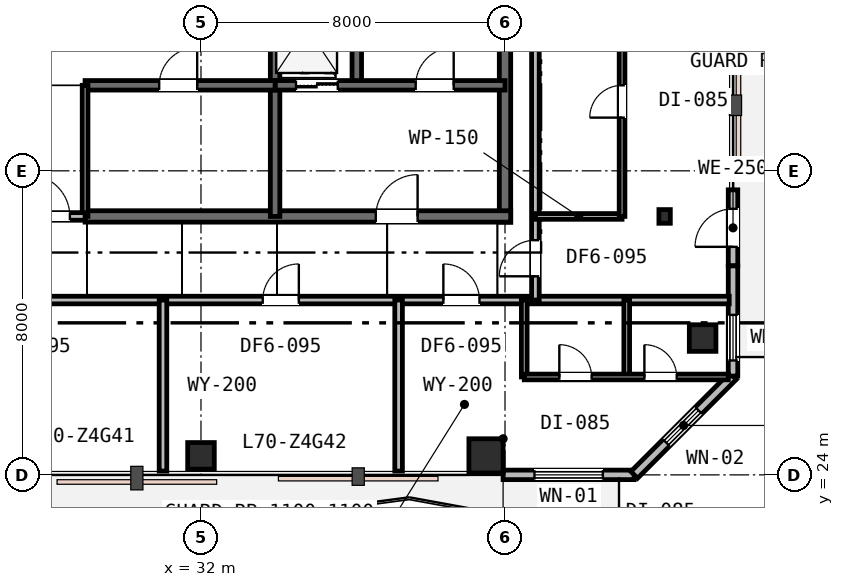
"""IFC4 building model, lengths in metres.
Left out: names, types, materials, properties, quantities, classifications, styles, units other than length and angle.
Written with IfcOpenShell. Run it as: python <this file> out.ifc"""

import sys

from ifc_helpers import new_model, si_unit, direction, frame, frame_2d, origin, origin_2d, place, context, subcontext, project, spatial, rectangle, i_section, extrude, element, fill, save


model = new_model("IFC4")
c1 = context("Model", 3, precision=1e-05, world=origin(), true_north=direction((0.0, 1.0)))
c2 = subcontext(c1, "Body", "Model", "MODEL_VIEW")
j1 = project(units=[si_unit("LENGTHUNIT", "METRE"), si_unit("PLANEANGLEUNIT", "RADIAN")], contexts=[c1])
p1 = place(None, origin())
s1 = spatial("IfcSite", under=j1, at=p1, CompositionType="ELEMENT")
p2 = place(p1, origin())
s2 = spatial("IfcBuilding", under=s1, at=p2, CompositionType="ELEMENT")
p3 = place(p2, frame((0.0, 0.0, 271.6)))
s3 = spatial("IfcBuildingStorey", under=s2, at=p3, CompositionType="ELEMENT", Elevation=271.6)
p4 = place(p3, frame((40.0, 30.65, 0.0), z_axis=(0.0, 0.0, 1.0), x_axis=(0.0, 1.0, 0.0)))
e1 = element("IfcWall", 1, at=p4, inside=s3, PredefinedType="SHEAR", context=c2, shape_type="SweptSolid", body=[
    extrude(rectangle(XDim=12.3, YDim=0.3, at=frame_2d((6.15, 0.0))), origin(), (0.0, 0.0, 1.0), 3.8),
])
p5 = place(p3, frame((28.95, 30.8, 0.0), z_axis=(0.0, 0.0, 1.0), x_axis=(1.0, 0.0, 0.0)))
e2 = element("IfcWall", 2, at=p5, inside=s3, PredefinedType="SHEAR", context=c2, shape_type="SweptSolid", body=[
    extrude(rectangle(XDim=11.2, YDim=0.3, at=frame_2d((5.6, 0.0))), origin(), (0.0, 0.0, 1.0), 3.8),
])
p6 = place(p5, frame((7.65, 0.0, 0.0)))
e3 = element("IfcOpeningElement", 3, at=p6, cuts=e2, PredefinedType="OPENING", context=c2, shape_type="SweptSolid", body=[
    extrude(rectangle(XDim=1.1, YDim=2.15, at=frame_2d((0.55, 1.075))), frame((0.0, 0.16, 0.0), z_axis=(0.0, -1.0, 0.0), x_axis=(1.0, 0.0, 0.0)), (0.0, 0.0, 1.0), 0.32),
])
p7 = place(p3, frame((36.1, 34.25, 0.0), z_axis=(0.0, 0.0, 1.0), x_axis=(0.0, 1.0, 0.0)))
e4 = element("IfcWall", 4, at=p7, inside=s3, PredefinedType="SHEAR", context=c2, shape_type="SweptSolid", body=[
    extrude(rectangle(XDim=8.65, YDim=0.25, at=frame_2d((4.325, 0.0))), origin(), (0.0, 0.0, 1.0), 3.8),
])
p8 = place(p3, frame((33.95, 30.8, 0.0), z_axis=(0.0, 0.0, 1.0), x_axis=(0.0, 1.0, 0.0)))
e5 = element("IfcWall", 5, at=p8, inside=s3, PredefinedType="SHEAR", context=c2, shape_type="SweptSolid", body=[
    extrude(rectangle(XDim=6.45, YDim=0.25, at=frame_2d((3.225, 0.0))), origin(), (0.0, 0.0, 1.0), 3.8),
])
p9 = place(p3, frame((33.95, 34.25, 0.0), z_axis=(0.0, 0.0, 1.0), x_axis=(1.0, 0.0, 0.0)))
e6 = element("IfcWall", 6, at=p9, inside=s3, PredefinedType="SHEAR", context=c2, shape_type="SweptSolid", body=[
    extrude(rectangle(XDim=6.05, YDim=0.25, at=frame_2d((3.025, 0.0))), origin(), (0.0, 0.0, 1.0), 3.8),
])
p10 = place(p9, frame((3.7, 0.0, 0.0)))
e7 = element("IfcOpeningElement", 7, at=p10, cuts=e6, PredefinedType="OPENING", context=c2, shape_type="SweptSolid", body=[
    extrude(rectangle(XDim=1.0, YDim=2.15, at=frame_2d((0.5, 1.075))), frame((0.0, 0.135, 0.0), z_axis=(0.0, -1.0, 0.0), x_axis=(1.0, 0.0, 0.0)), (0.0, 0.0, 1.0), 0.27),
])
p11 = place(p9, frame((0.55, 0.0, 0.0)))
e8 = element("IfcOpeningElement", 8, at=p11, cuts=e6, PredefinedType="OPENING", context=c2, shape_type="SweptSolid", body=[
    extrude(rectangle(XDim=1.1, YDim=2.15, at=frame_2d((0.55, 1.075))), frame((0.0, 0.135, 0.0), z_axis=(0.0, -1.0, 0.0), x_axis=(1.0, 0.0, 0.0)), (0.0, 0.0, 1.0), 0.27),
])
p12 = place(p3, frame((28.95, 34.25, 0.0), z_axis=(0.0, 0.0, 1.0), x_axis=(1.0, 0.0, 0.0)))
e9 = element("IfcWall", 9, at=p12, inside=s3, PredefinedType="SHEAR", context=c2, shape_type="SweptSolid", body=[
    extrude(rectangle(XDim=5.0, YDim=0.25, at=frame_2d((2.5, 0.0))), origin(), (0.0, 0.0, 1.0), 3.8),
])
p13 = place(p12, frame((1.95, 0.0, 0.0)))
e10 = element("IfcOpeningElement", 10, at=p13, cuts=e9, PredefinedType="OPENING", context=c2, shape_type="SweptSolid", body=[
    extrude(rectangle(XDim=1.0, YDim=2.15, at=frame_2d((0.5, 1.075))), frame((0.0, 0.135, 0.0), z_axis=(0.0, -1.0, 0.0), x_axis=(1.0, 0.0, 0.0)), (0.0, 0.0, 1.0), 0.27),
])
p14 = place(p3, frame((32.0, 24.5, 0.0), z_axis=(0.0, 0.0, 1.0), x_axis=(1.0, 0.0, 0.0)))
e11 = element("IfcColumn", 11, at=p14, inside=s3, PredefinedType="COLUMN", context=c2, shape_type="SweptSolid", body=[
    extrude(rectangle(XDim=0.7, YDim=0.7, at=origin_2d()), origin(), (0.0, 0.0, 1.0), 3.8),
])
p15 = place(p3, frame((39.5, 24.5, 0.0), z_axis=(0.0, 0.0, 1.0), x_axis=(1.0, 0.0, 0.0)))
e12 = element("IfcColumn", 12, at=p15, inside=s3, PredefinedType="COLUMN", context=c2, shape_type="SweptSolid", body=[
    extrude(rectangle(XDim=0.9, YDim=0.9, at=origin_2d()), origin(), (0.0, 0.0, 1.0), 3.8),
])
p16 = place(p3, frame((45.2, 27.6, 0.0), z_axis=(0.0, 0.0, 1.0), x_axis=(1.0, 0.0, 0.0)))
e13 = element("IfcColumn", 13, at=p16, inside=s3, PredefinedType="COLUMN", context=c2, shape_type="SweptSolid", body=[
    extrude(rectangle(XDim=0.7, YDim=0.7, at=origin_2d()), origin(), (0.0, 0.0, 1.0), 3.8),
])
p17 = place(p3, frame((44.2, 30.8, 0.0), z_axis=(0.0, 0.0, 1.0), x_axis=(1.0, 0.0, 0.0)))
e14 = element("IfcColumn", 14, at=p17, inside=s3, PredefinedType="COLUMN", context=c2, shape_type="SweptSolid", body=[
    extrude(i_section(OverallWidth=0.3, OverallDepth=0.36, WebThickness=0.013, FlangeThickness=0.022, FilletRadius=0.027, at=origin_2d()), origin(), (0.0, 0.0, 1.0), 3.8),
])
p18 = place(p3, frame((39.95, 24.0, 0.0), z_axis=(0.0, 0.0, 1.0), x_axis=(1.0, 0.0, 0.0)))
e15 = element("IfcWall", 15, at=p18, inside=s3, PredefinedType="STANDARD", context=c2, shape_type="SweptSolid", body=[
    extrude(rectangle(XDim=3.45, YDim=0.25, at=frame_2d((1.725, 0.0))), origin(), (0.0, 0.0, 1.0), 3.53),
])
p19 = place(p18, frame((0.825, 0.0, 0.75)))
e16 = element("IfcOpeningElement", 16, at=p19, cuts=e15, PredefinedType="OPENING", context=c2, shape_type="SweptSolid", body=[
    extrude(rectangle(XDim=1.8, YDim=1.85, at=frame_2d((0.9, 0.925))), frame((0.0, 0.135, 0.0), z_axis=(0.0, -1.0, 0.0), x_axis=(1.0, 0.0, 0.0)), (0.0, 0.0, 1.0), 0.27),
])
p20 = place(p3, frame((43.4, 24.0, 0.0), z_axis=(0.0, 0.0, 1.0), x_axis=(0.707106781187, 0.707106781187, 0.0)))
e17 = element("IfcWall", 17, at=p20, inside=s3, PredefinedType="STANDARD", context=c2, shape_type="SweptSolid", body=[
    extrude(rectangle(XDim=3.677, YDim=0.25, at=frame_2d((1.839, 0.0))), origin(), (0.0, 0.0, 1.0), 3.53),
])
p21 = place(p20, frame((1.196, 0.0, 0.85)))
e18 = element("IfcOpeningElement", 18, at=p21, cuts=e17, PredefinedType="OPENING", context=c2, shape_type="SweptSolid", body=[
    extrude(rectangle(XDim=1.2, YDim=1.6, at=frame_2d((0.6, 0.8))), frame((0.0, 0.135, 0.0), z_axis=(0.0, -1.0, 0.0), x_axis=(1.0, 0.0, 0.0)), (0.0, 0.0, 1.0), 0.27),
])
p22 = place(p3, frame((46.0, 29.5, 0.0), z_axis=(0.0, 0.0, 1.0), x_axis=(0.0, 1.0, 0.0)))
e19 = element("IfcWall", 19, at=p22, inside=s3, PredefinedType="STANDARD", context=c2, shape_type="SweptSolid", body=[
    extrude(rectangle(XDim=2.0, YDim=0.25, at=frame_2d((1.0, 0.0))), origin(), (0.0, 0.0, 1.0), 3.53),
])
p23 = place(p22, frame((0.5, 0.0, 0.0)))
e20 = element("IfcOpeningElement", 20, at=p23, cuts=e19, PredefinedType="OPENING", context=c2, shape_type="SweptSolid", body=[
    extrude(rectangle(XDim=1.0, YDim=2.15, at=frame_2d((0.5, 1.075))), frame((0.0, 0.135, 0.0), z_axis=(0.0, -1.0, 0.0), x_axis=(1.0, 0.0, 0.0)), (0.0, 0.0, 1.0), 0.27),
])
p24 = place(p3, frame((46.0, 26.6, 0.0), z_axis=(0.0, 0.0, 1.0), x_axis=(0.0, 1.0, 0.0)))
e21 = element("IfcWall", 21, at=p24, inside=s3, PredefinedType="STANDARD", context=c2, shape_type="SweptSolid", body=[
    extrude(rectangle(XDim=2.9, YDim=0.25, at=frame_2d((1.45, 0.0))), origin(), (0.0, 0.0, 1.0), 3.53),
])
p25 = place(p24, frame((0.41, 0.0, 0.85)))
e22 = element("IfcOpeningElement", 22, at=p25, cuts=e21, PredefinedType="OPENING", context=c2, shape_type="SweptSolid", body=[
    extrude(rectangle(XDim=1.2, YDim=1.6, at=frame_2d((0.6, 0.8))), frame((0.0, 0.135, 0.0), z_axis=(0.0, -1.0, 0.0), x_axis=(1.0, 0.0, 0.0)), (0.0, 0.0, 1.0), 0.27),
])
p26 = place(p3, frame((28.95, 30.8, 0.0), z_axis=(0.0, 0.0, 1.0), x_axis=(0.0, 1.0, 0.0)))
e23 = element("IfcWall", 23, at=p26, inside=s3, PredefinedType="PLUMBINGWALL", context=c2, shape_type="SweptSolid", body=[
    extrude(rectangle(XDim=3.45, YDim=0.15, at=frame_2d((1.725, 0.0))), origin(), (0.0, 0.0, 1.0), 3.28),
])
p27 = place(p3, frame((27.05, 30.8, 0.0), z_axis=(0.0, 0.0, 1.0), x_axis=(1.0, 0.0, 0.0)))
e24 = element("IfcWall", 24, at=p27, inside=s3, PredefinedType="PARTITIONING", context=c2, shape_type="SweptSolid", body=[
    extrude(rectangle(XDim=1.9, YDim=0.2, at=frame_2d((0.95, 0.0))), origin(), (0.0, 0.0, 1.0), 3.28),
])
p28 = place(p27, frame((0.4, 0.0, 0.0)))
e25 = element("IfcOpeningElement", 25, at=p28, cuts=e24, PredefinedType="OPENING", context=c2, shape_type="SweptSolid", body=[
    extrude(rectangle(XDim=1.1, YDim=2.15, at=frame_2d((0.55, 1.075))), frame((0.0, 0.11, 0.0), z_axis=(0.0, -1.0, 0.0), x_axis=(1.0, 0.0, 0.0)), (0.0, 0.0, 1.0), 0.22),
])
p29 = place(p3, frame((20.0, 28.6, 0.0), z_axis=(0.0, 0.0, 1.0), x_axis=(1.0, 0.0, 0.0)))
e26 = element("IfcWall", 26, at=p29, inside=s3, PredefinedType="PARTITIONING", context=c2, shape_type="SweptSolid", body=[
    extrude(rectangle(XDim=25.9, YDim=0.2, at=frame_2d((12.95, 0.0))), origin(), (0.0, 0.0, 1.0), 3.16),
])
p30 = place(p29, frame((7.025, 0.0, 0.0)))
e27 = element("IfcOpeningElement", 27, at=p30, cuts=e26, PredefinedType="OPENING", context=c2, shape_type="SweptSolid", body=[
    extrude(rectangle(XDim=0.95, YDim=2.15, at=frame_2d((0.475, 1.075))), frame((0.0, 0.11, 0.0), z_axis=(0.0, -1.0, 0.0), x_axis=(1.0, 0.0, 0.0)), (0.0, 0.0, 1.0), 0.22),
])
p31 = place(p29, frame((13.625, 0.0, 0.0)))
e28 = element("IfcOpeningElement", 28, at=p31, cuts=e26, PredefinedType="OPENING", context=c2, shape_type="SweptSolid", body=[
    extrude(rectangle(XDim=0.95, YDim=2.15, at=frame_2d((0.475, 1.075))), frame((0.0, 0.11, 0.0), z_axis=(0.0, -1.0, 0.0), x_axis=(1.0, 0.0, 0.0)), (0.0, 0.0, 1.0), 0.22),
])
p32 = place(p29, frame((18.378, 0.0, 0.0)))
e29 = element("IfcOpeningElement", 29, at=p32, cuts=e26, PredefinedType="OPENING", context=c2, shape_type="SweptSolid", body=[
    extrude(rectangle(XDim=0.95, YDim=2.15, at=frame_2d((0.475, 1.075))), frame((0.0, 0.11, 0.0), z_axis=(0.0, -1.0, 0.0), x_axis=(1.0, 0.0, 0.0)), (0.0, 0.0, 1.0), 0.22),
])
p33 = place(p3, frame((40.8, 28.6, 0.0), z_axis=(0.0, 0.0, 1.0), x_axis=(0.0, 1.0, 0.0)))
e30 = element("IfcWall", 30, at=p33, inside=s3, PredefinedType="PARTITIONING", context=c2, shape_type="SweptSolid", body=[
    extrude(rectangle(XDim=14.3, YDim=0.2, at=frame_2d((7.15, 0.0))), origin(), (0.0, 0.0, 1.0), 3.16),
])
p34 = place(p33, frame((0.625, 0.0, 0.0)))
e31 = element("IfcOpeningElement", 31, at=p34, cuts=e30, PredefinedType="OPENING", context=c2, shape_type="SweptSolid", body=[
    extrude(rectangle(XDim=0.95, YDim=2.15, at=frame_2d((0.475, 1.075))), frame((0.0, 0.11, 0.0), z_axis=(0.0, -1.0, 0.0), x_axis=(1.0, 0.0, 0.0)), (0.0, 0.0, 1.0), 0.22),
])
p35 = place(p3, frame((40.8, 30.8, 0.0), z_axis=(0.0, 0.0, 1.0), x_axis=(1.0, 0.0, 0.0)))
e32 = element("IfcWall", 32, at=p35, inside=s3, PredefinedType="PARTITIONING", context=c2, shape_type="SweptSolid", body=[
    extrude(rectangle(XDim=2.28, YDim=0.15, at=frame_2d((1.14, 0.0))), origin(), (0.0, 0.0, 1.0), 3.16),
])
p36 = place(p3, frame((43.08, 30.8, 0.0), z_axis=(0.0, 0.0, 1.0), x_axis=(0.0, 1.0, 0.0)))
e33 = element("IfcWall", 33, at=p36, inside=s3, PredefinedType="PARTITIONING", context=c2, shape_type="SweptSolid", body=[
    extrude(rectangle(XDim=12.1, YDim=0.15, at=frame_2d((6.05, 0.0))), origin(), (0.0, 0.0, 1.0), 3.16),
])
p37 = place(p36, frame((2.6, 0.0, 0.0)))
e34 = element("IfcOpeningElement", 34, at=p37, cuts=e33, PredefinedType="OPENING", context=c2, shape_type="SweptSolid", body=[
    extrude(rectangle(XDim=0.85, YDim=2.15, at=frame_2d((0.425, 1.075))), frame((0.0, 0.085, 0.0), z_axis=(0.0, -1.0, 0.0), x_axis=(1.0, 0.0, 0.0)), (0.0, 0.0, 1.0), 0.17),
])
p38 = place(p36, frame((10.704, 0.0, 0.0)))
e35 = element("IfcOpeningElement", 35, at=p38, cuts=e33, PredefinedType="OPENING", context=c2, shape_type="SweptSolid", body=[
    extrude(rectangle(XDim=0.85, YDim=2.15, at=frame_2d((0.425, 1.075))), frame((0.0, 0.085, 0.0), z_axis=(0.0, -1.0, 0.0), x_axis=(1.0, 0.0, 0.0)), (0.0, 0.0, 1.0), 0.17),
])
for number, where, z_axis, x_axis in (
    (36, (31.0, 24.1, 0.0), (0.0, 0.0, 1.0), (0.0, 1.0, 0.0)),
    (37, (37.2, 24.1, 0.0), (0.0, 0.0, 1.0), (0.0, 1.0, 0.0)),
):
    element("IfcWall", number, at=place(p3, frame(where, z_axis=z_axis, x_axis=x_axis)), inside=s3, PredefinedType="PARTITIONING", context=c2, shape_type="SweptSolid", body=[
        extrude(rectangle(XDim=4.5, YDim=0.2, at=frame_2d((2.25, 0.0))), origin(), (0.0, 0.0, 1.0), 3.27),
    ])
for number, where, z_axis, x_axis in (
    (38, (40.506, 26.576, 0.0), (0.0, 0.0, 1.0), (0.0, 1.0, 0.0)),
    (39, (43.203, 26.576, 0.0), (0.0, 0.0, 1.0), (0.0, 1.0, 0.0)),
):
    element("IfcWall", number, at=place(p3, frame(where, z_axis=z_axis, x_axis=x_axis)), inside=s3, PredefinedType="PARTITIONING", context=c2, shape_type="SweptSolid", body=[
        extrude(rectangle(XDim=2.024, YDim=0.15, at=frame_2d((1.012, 0.0))), origin(), (0.0, 0.0, 1.0), 3.53),
    ])
p39 = place(p3, frame((40.506, 26.576, 0.0), z_axis=(0.0, 0.0, 1.0), x_axis=(1.0, 0.0, 0.0)))
e40 = element("IfcWall", 40, at=p39, inside=s3, PredefinedType="PARTITIONING", context=c2, shape_type="SweptSolid", body=[
    extrude(rectangle(XDim=5.37, YDim=0.15, at=frame_2d((2.685, 0.0))), origin(), (0.0, 0.0, 1.0), 3.53),
])
p40 = place(p39, frame((0.923, 0.0, 0.0)))
e41 = element("IfcOpeningElement", 41, at=p40, cuts=e40, PredefinedType="OPENING", context=c2, shape_type="SweptSolid", body=[
    extrude(rectangle(XDim=0.85, YDim=2.15, at=frame_2d((0.425, 1.075))), frame((0.0, 0.085, 0.0), z_axis=(0.0, -1.0, 0.0), x_axis=(1.0, 0.0, 0.0)), (0.0, 0.0, 1.0), 0.17),
])
p41 = place(p39, frame((3.162, 0.0, 0.0)))
e42 = element("IfcOpeningElement", 42, at=p41, cuts=e40, PredefinedType="OPENING", context=c2, shape_type="SweptSolid", body=[
    extrude(rectangle(XDim=0.85, YDim=2.15, at=frame_2d((0.425, 1.075))), frame((0.0, 0.085, 0.0), z_axis=(0.0, -1.0, 0.0), x_axis=(1.0, 0.0, 0.0)), (0.0, 0.0, 1.0), 0.17),
])
p42 = place(p19, origin())
e43 = element("IfcWindow", 43, at=p42, inside=s3, PartitioningType="SINGLE_PANEL", PredefinedType="WINDOW", context=c2, shape_type="SweptSolid", body=[
    extrude(rectangle(XDim=1.8, YDim=1.85, at=frame_2d((0.9, 0.925))), frame((0.0, 0.03, 0.0), z_axis=(0.0, -1.0, 0.0), x_axis=(1.0, 0.0, 0.0)), (0.0, 0.0, 1.0), 0.06),
])
fill(e16, e43)
p43 = place(p21, origin())
e44 = element("IfcWindow", 44, at=p43, inside=s3, PartitioningType="SINGLE_PANEL", PredefinedType="WINDOW", context=c2, shape_type="SweptSolid", body=[
    extrude(rectangle(XDim=1.2, YDim=1.6, at=frame_2d((0.6, 0.8))), frame((0.0, 0.03, 0.0), z_axis=(0.0, -1.0, 0.0), x_axis=(1.0, 0.0, 0.0)), (0.0, 0.0, 1.0), 0.06),
])
fill(e18, e44)
p44 = place(p23, origin())
e45 = element("IfcDoor", 45, at=p44, inside=s3, OperationType="SINGLE_SWING_LEFT", PredefinedType="DOOR", context=c2, shape_type="SweptSolid", body=[
    extrude(rectangle(XDim=1.0, YDim=2.15, at=frame_2d((0.5, 1.075))), frame((0.0, 0.025, 0.0), z_axis=(0.0, -1.0, 0.0), x_axis=(1.0, 0.0, 0.0)), (0.0, 0.0, 1.0), 0.05),
])
fill(e20, e45)
p45 = place(p25, origin())
e46 = element("IfcWindow", 46, at=p45, inside=s3, PartitioningType="SINGLE_PANEL", PredefinedType="WINDOW", context=c2, shape_type="SweptSolid", body=[
    extrude(rectangle(XDim=1.2, YDim=1.6, at=frame_2d((0.6, 0.8))), frame((0.0, 0.03, 0.0), z_axis=(0.0, -1.0, 0.0), x_axis=(1.0, 0.0, 0.0)), (0.0, 0.0, 1.0), 0.06),
])
fill(e22, e46)
p46 = place(p28, origin())
e47 = element("IfcDoor", 47, at=p46, inside=s3, OperationType="SINGLE_SWING_LEFT", PredefinedType="DOOR", context=c2, shape_type="SweptSolid", body=[
    extrude(rectangle(XDim=1.1, YDim=2.15, at=frame_2d((0.55, 1.075))), frame((0.0, 0.025, 0.0), z_axis=(0.0, -1.0, 0.0), x_axis=(1.0, 0.0, 0.0)), (0.0, 0.0, 1.0), 0.05),
])
fill(e25, e47)
p47 = place(p10, origin())
e48 = element("IfcDoor", 48, at=p47, inside=s3, OperationType="SINGLE_SWING_RIGHT", PredefinedType="DOOR", context=c2, shape_type="SweptSolid", body=[
    extrude(rectangle(XDim=1.0, YDim=2.15, at=frame_2d((0.5, 1.075))), frame((0.0, 0.025, 0.0), z_axis=(0.0, -1.0, 0.0), x_axis=(1.0, 0.0, 0.0)), (0.0, 0.0, 1.0), 0.05),
])
fill(e7, e48)
p48 = place(p6, origin())
e49 = element("IfcDoor", 49, at=p48, inside=s3, OperationType="SINGLE_SWING_RIGHT", PredefinedType="DOOR", context=c2, shape_type="SweptSolid", body=[
    extrude(rectangle(XDim=1.1, YDim=2.15, at=frame_2d((0.55, 1.075))), frame((0.0, 0.025, 0.0), z_axis=(0.0, -1.0, 0.0), x_axis=(1.0, 0.0, 0.0)), (0.0, 0.0, 1.0), 0.05),
])
fill(e3, e49)
p49 = place(p13, origin())
e50 = element("IfcDoor", 50, at=p49, inside=s3, OperationType="SINGLE_SWING_RIGHT", PredefinedType="DOOR", context=c2, shape_type="SweptSolid", body=[
    extrude(rectangle(XDim=1.0, YDim=2.15, at=frame_2d((0.5, 1.075))), frame((0.0, 0.025, 0.0), z_axis=(0.0, -1.0, 0.0), x_axis=(1.0, 0.0, 0.0)), (0.0, 0.0, 1.0), 0.05),
])
fill(e10, e50)
p50 = place(p34, origin())
e51 = element("IfcDoor", 51, at=p50, inside=s3, OperationType="SINGLE_SWING_LEFT", PredefinedType="DOOR", context=c2, shape_type="SweptSolid", body=[
    extrude(rectangle(XDim=0.95, YDim=2.15, at=frame_2d((0.475, 1.075))), frame((0.0, 0.025, 0.0), z_axis=(0.0, -1.0, 0.0), x_axis=(1.0, 0.0, 0.0)), (0.0, 0.0, 1.0), 0.05),
])
fill(e31, e51)
p51 = place(p37, origin())
e52 = element("IfcDoor", 52, at=p51, inside=s3, OperationType="SINGLE_SWING_LEFT", PredefinedType="DOOR", context=c2, shape_type="SweptSolid", body=[
    extrude(rectangle(XDim=0.85, YDim=2.15, at=frame_2d((0.425, 1.075))), frame((0.0, 0.025, 0.0), z_axis=(0.0, -1.0, 0.0), x_axis=(1.0, 0.0, 0.0)), (0.0, 0.0, 1.0), 0.05),
])
fill(e34, e52)
p52 = place(p31, origin())
e53 = element("IfcDoor", 53, at=p52, inside=s3, OperationType="SINGLE_SWING_RIGHT", PredefinedType="DOOR", context=c2, shape_type="SweptSolid", body=[
    extrude(rectangle(XDim=0.95, YDim=2.15, at=frame_2d((0.475, 1.075))), frame((0.0, 0.025, 0.0), z_axis=(0.0, -1.0, 0.0), x_axis=(1.0, 0.0, 0.0)), (0.0, 0.0, 1.0), 0.05),
])
fill(e28, e53)
p53 = place(p32, origin())
e54 = element("IfcDoor", 54, at=p53, inside=s3, OperationType="SINGLE_SWING_LEFT", PredefinedType="DOOR", context=c2, shape_type="SweptSolid", body=[
    extrude(rectangle(XDim=0.95, YDim=2.15, at=frame_2d((0.475, 1.075))), frame((0.0, 0.025, 0.0), z_axis=(0.0, -1.0, 0.0), x_axis=(1.0, 0.0, 0.0)), (0.0, 0.0, 1.0), 0.05),
])
fill(e29, e54)
p54 = place(p40, origin())
e55 = element("IfcDoor", 55, at=p54, inside=s3, OperationType="SINGLE_SWING_LEFT", PredefinedType="DOOR", context=c2, shape_type="SweptSolid", body=[
    extrude(rectangle(XDim=0.85, YDim=2.15, at=frame_2d((0.425, 1.075))), frame((0.0, 0.025, 0.0), z_axis=(0.0, -1.0, 0.0), x_axis=(1.0, 0.0, 0.0)), (0.0, 0.0, 1.0), 0.05),
])
fill(e41, e55)
p55 = place(p41, origin())
e56 = element("IfcDoor", 56, at=p55, inside=s3, OperationType="SINGLE_SWING_LEFT", PredefinedType="DOOR", context=c2, shape_type="SweptSolid", body=[
    extrude(rectangle(XDim=0.85, YDim=2.15, at=frame_2d((0.425, 1.075))), frame((0.0, 0.025, 0.0), z_axis=(0.0, -1.0, 0.0), x_axis=(1.0, 0.0, 0.0)), (0.0, 0.0, 1.0), 0.05),
])
fill(e42, e56)
p56 = place(p11, origin())
e57 = element("IfcDoor", 57, at=p56, inside=s3, OperationType="DOUBLE_DOOR_SLIDING", PredefinedType="DOOR", context=c2, shape_type="SweptSolid", body=[
    extrude(rectangle(XDim=1.1, YDim=2.15, at=frame_2d((0.55, 1.075))), frame((0.0, 0.025, 0.0), z_axis=(0.0, -1.0, 0.0), x_axis=(1.0, 0.0, 0.0)), (0.0, 0.0, 1.0), 0.05),
])
fill(e8, e57)
save(model, sys.argv[1])
